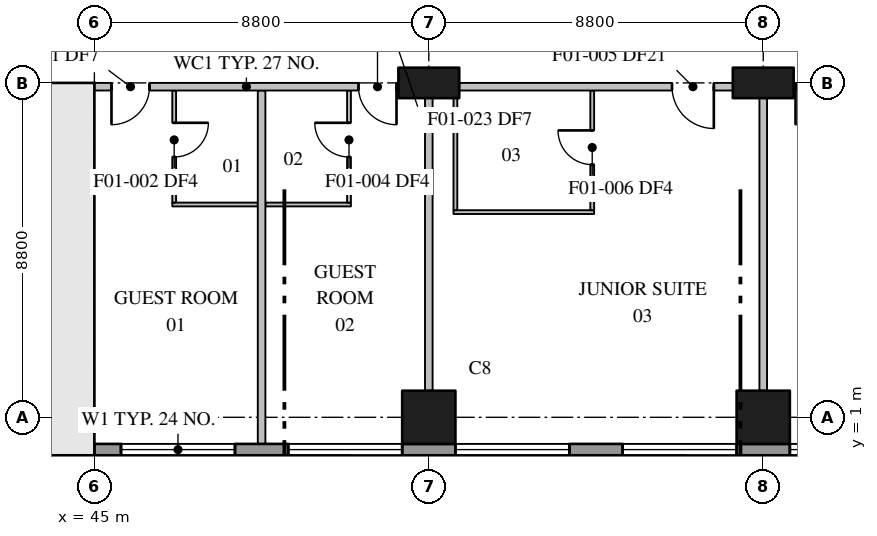
"""IFC4 building model, lengths in metres.
Left out: names, types, materials, properties, quantities, classifications, styles, units other than length and angle.
Written with IfcOpenShell. Run it as: python <this file> out.ifc"""

import sys

from ifc_helpers import new_model, si_unit, direction, frame, frame_2d, origin, origin_2d, place, context, subcontext, project, spatial, rectangle, extrude, element, fill, save


model = new_model("IFC4")
c1 = context("Model", 3, precision=1e-05, world=origin(), true_north=direction((0.0, 1.0)))
c2 = subcontext(c1, "Body", "Model", "MODEL_VIEW")
j1 = project(units=[si_unit("LENGTHUNIT", "METRE"), si_unit("PLANEANGLEUNIT", "RADIAN")], contexts=[c1])
p1 = place(None, origin())
s1 = spatial("IfcSite", under=j1, at=p1, CompositionType="ELEMENT")
p2 = place(p1, origin())
s2 = spatial("IfcBuilding", under=s1, at=p2, CompositionType="ELEMENT")
p3 = place(p2, frame((0.0, 0.0, 34.0)))
s3 = spatial("IfcBuildingStorey", under=s2, at=p3, CompositionType="ELEMENT", Elevation=34.0)
p4 = place(p3, frame((53.8, 1.0, 0.0), z_axis=(0.0, 0.0, 1.0), x_axis=(1.0, 0.0, 0.0)))
e1 = element("IfcColumn", 1, at=p4, inside=s3, PredefinedType="COLUMN", context=c2, shape_type="SweptSolid", body=[
    extrude(rectangle(XDim=1.4, YDim=1.4, at=origin_2d()), origin(), (0.0, 0.0, 1.0), 3.7),
])
p5 = place(p3, frame((53.8, 9.8, 0.0), z_axis=(0.0, 0.0, 1.0), x_axis=(1.0, 0.0, 0.0)))
e2 = element("IfcColumn", 2, at=p5, inside=s3, PredefinedType="COLUMN", context=c2, shape_type="SweptSolid", body=[
    extrude(rectangle(XDim=1.6, YDim=0.8, at=origin_2d()), origin(), (0.0, 0.0, 1.0), 3.7),
])
p6 = place(p3, frame((62.6, 1.0, 0.0), z_axis=(0.0, 0.0, 1.0), x_axis=(1.0, 0.0, 0.0)))
e3 = element("IfcColumn", 3, at=p6, inside=s3, PredefinedType="COLUMN", context=c2, shape_type="SweptSolid", body=[
    extrude(rectangle(XDim=1.4, YDim=1.4, at=origin_2d()), origin(), (0.0, 0.0, 1.0), 3.7),
])
p7 = place(p3, frame((62.6, 9.8, 0.0), z_axis=(0.0, 0.0, 1.0), x_axis=(1.0, 0.0, 0.0)))
e4 = element("IfcColumn", 4, at=p7, inside=s3, PredefinedType="COLUMN", context=c2, shape_type="SweptSolid", body=[
    extrude(rectangle(XDim=1.6, YDim=0.8, at=origin_2d()), origin(), (0.0, 0.0, 1.0), 3.7),
])
p8 = place(p3, frame((9.8, 0.7, 0.0), z_axis=(0.0, 0.0, 1.0), x_axis=(1.0, 0.0, 0.0)))
e5 = element("IfcWall", 5, at=p8, inside=s3, PredefinedType="SHEAR", context=c2, shape_type="SweptSolid", body=[
    extrude(rectangle(XDim=35.2, YDim=1.0, at=frame_2d((17.6, 0.0))), origin(), (0.0, 0.0, 1.0), 3.7),
])
p9 = place(p3, frame((44.3, 1.2, 0.0), z_axis=(0.0, 0.0, 1.0), x_axis=(0.0, 1.0, 0.0)))
e6 = element("IfcWall", 6, at=p9, inside=s3, PredefinedType="SHEAR", context=c2, shape_type="SweptSolid", body=[
    extrude(rectangle(XDim=8.6, YDim=1.0, at=frame_2d((4.3, 0.0))), origin(), (0.0, 0.0, 1.0), 3.7),
])
p10 = place(p3, frame((40.7, 9.6, 0.0), z_axis=(0.0, 0.0, 1.0), x_axis=(1.0, 0.0, 0.0)))
e7 = element("IfcWall", 7, at=p10, inside=s3, PredefinedType="SHEAR", context=c2, shape_type="SweptSolid", body=[
    extrude(rectangle(XDim=4.3, YDim=0.4, at=frame_2d((2.15, 0.0))), origin(), (0.0, 0.0, 1.0), 3.7),
])
p11 = place(p10, frame((1.05, 0.0, 0.0)))
e8 = element("IfcOpeningElement", 8, at=p11, cuts=e7, PredefinedType="OPENING", context=c2, shape_type="SweptSolid", body=[
    extrude(rectangle(XDim=1.2, YDim=2.1, at=frame_2d((0.6, 1.05))), frame((0.0, 0.21, 0.0), z_axis=(0.0, -1.0, 0.0), x_axis=(1.0, 0.0, 0.0)), (0.0, 0.0, 1.0), 0.42),
])
p12 = place(p3, frame((45.0, 0.15, 0.0), z_axis=(0.0, 0.0, 1.0), x_axis=(1.0, 0.0, 0.0)))
e9 = element("IfcWall", 9, at=p12, inside=s3, PredefinedType="STANDARD", context=c2, shape_type="SweptSolid", body=[
    extrude(rectangle(XDim=34.0, YDim=0.3, at=frame_2d((17.0, 0.0))), origin(), (0.0, 0.0, 1.0), 3.4),
])
p13 = place(p12, frame((0.7, 0.0, 0.75)))
e10 = element("IfcOpeningElement", 10, at=p13, cuts=e9, PredefinedType="OPENING", context=c2, shape_type="SweptSolid", body=[
    extrude(rectangle(XDim=3.0, YDim=2.3, at=frame_2d((1.5, 1.15))), frame((0.0, 0.16, 0.0), z_axis=(0.0, -1.0, 0.0), x_axis=(1.0, 0.0, 0.0)), (0.0, 0.0, 1.0), 0.32),
])
p14 = place(p12, frame((5.1, 0.0, 0.75)))
e11 = element("IfcOpeningElement", 11, at=p14, cuts=e9, PredefinedType="OPENING", context=c2, shape_type="SweptSolid", body=[
    extrude(rectangle(XDim=3.0, YDim=2.3, at=frame_2d((1.5, 1.15))), frame((0.0, 0.16, 0.0), z_axis=(0.0, -1.0, 0.0), x_axis=(1.0, 0.0, 0.0)), (0.0, 0.0, 1.0), 0.32),
])
p15 = place(p12, frame((9.5, 0.0, 0.75)))
e12 = element("IfcOpeningElement", 12, at=p15, cuts=e9, PredefinedType="OPENING", context=c2, shape_type="SweptSolid", body=[
    extrude(rectangle(XDim=3.0, YDim=2.3, at=frame_2d((1.5, 1.15))), frame((0.0, 0.16, 0.0), z_axis=(0.0, -1.0, 0.0), x_axis=(1.0, 0.0, 0.0)), (0.0, 0.0, 1.0), 0.32),
])
p16 = place(p12, frame((13.9, 0.0, 0.75)))
e13 = element("IfcOpeningElement", 13, at=p16, cuts=e9, PredefinedType="OPENING", context=c2, shape_type="SweptSolid", body=[
    extrude(rectangle(XDim=3.0, YDim=2.3, at=frame_2d((1.5, 1.15))), frame((0.0, 0.16, 0.0), z_axis=(0.0, -1.0, 0.0), x_axis=(1.0, 0.0, 0.0)), (0.0, 0.0, 1.0), 0.32),
])
p17 = place(p12, frame((18.3, 0.0, 0.75)))
e14 = element("IfcOpeningElement", 14, at=p17, cuts=e9, PredefinedType="OPENING", context=c2, shape_type="SweptSolid", body=[
    extrude(rectangle(XDim=3.0, YDim=2.3, at=frame_2d((1.5, 1.15))), frame((0.0, 0.16, 0.0), z_axis=(0.0, -1.0, 0.0), x_axis=(1.0, 0.0, 0.0)), (0.0, 0.0, 1.0), 0.32),
])
p18 = place(p12, frame((22.7, 0.0, 0.75)))
e15 = element("IfcOpeningElement", 15, at=p18, cuts=e9, PredefinedType="OPENING", context=c2, shape_type="SweptSolid", body=[
    extrude(rectangle(XDim=3.0, YDim=2.3, at=frame_2d((1.5, 1.15))), frame((0.0, 0.16, 0.0), z_axis=(0.0, -1.0, 0.0), x_axis=(1.0, 0.0, 0.0)), (0.0, 0.0, 1.0), 0.32),
])
p19 = place(p12, frame((27.1, 0.0, 0.75)))
e16 = element("IfcOpeningElement", 16, at=p19, cuts=e9, PredefinedType="OPENING", context=c2, shape_type="SweptSolid", body=[
    extrude(rectangle(XDim=3.0, YDim=2.3, at=frame_2d((1.5, 1.15))), frame((0.0, 0.16, 0.0), z_axis=(0.0, -1.0, 0.0), x_axis=(1.0, 0.0, 0.0)), (0.0, 0.0, 1.0), 0.32),
])
p20 = place(p3, frame((53.0, 9.7, 0.0), z_axis=(0.0, 0.0, 1.0), x_axis=(-1.0, 0.0, 0.0)))
e17 = element("IfcWall", 17, at=p20, inside=s3, PredefinedType="PARTITIONING", context=c2, shape_type="SweptSolid", body=[
    extrude(rectangle(XDim=8.0, YDim=0.2, at=frame_2d((4.0, 0.0))), origin(), (0.0, 0.0, 1.0), 3.4),
])
p21 = place(p20, frame((6.55, 0.0, 0.0)))
e18 = element("IfcOpeningElement", 18, at=p21, cuts=e17, PredefinedType="OPENING", context=c2, shape_type="SweptSolid", body=[
    extrude(rectangle(XDim=1.0, YDim=2.1, at=frame_2d((0.5, 1.05))), frame((0.0, 0.11, 0.0), z_axis=(0.0, -1.0, 0.0), x_axis=(1.0, 0.0, 0.0)), (0.0, 0.0, 1.0), 0.22),
])
p22 = place(p20, frame((0.05, 0.0, 0.0)))
e19 = element("IfcOpeningElement", 19, at=p22, cuts=e17, PredefinedType="OPENING", context=c2, shape_type="SweptSolid", body=[
    extrude(rectangle(XDim=1.0, YDim=2.1, at=frame_2d((0.5, 1.05))), frame((0.0, 0.11, 0.0), z_axis=(0.0, -1.0, 0.0), x_axis=(1.0, 0.0, 0.0)), (0.0, 0.0, 1.0), 0.22),
])
p23 = place(p3, frame((61.8, 9.7, 0.0), z_axis=(0.0, 0.0, 1.0), x_axis=(-1.0, 0.0, 0.0)))
e20 = element("IfcWall", 20, at=p23, inside=s3, PredefinedType="PARTITIONING", context=c2, shape_type="SweptSolid", body=[
    extrude(rectangle(XDim=7.2, YDim=0.2, at=frame_2d((3.6, 0.0))), origin(), (0.0, 0.0, 1.0), 3.4),
])
p24 = place(p23, frame((0.5, 0.0, 0.0)))
e21 = element("IfcOpeningElement", 21, at=p24, cuts=e20, PredefinedType="OPENING", context=c2, shape_type="SweptSolid", body=[
    extrude(rectangle(XDim=1.1, YDim=2.1, at=frame_2d((0.55, 1.05))), frame((0.0, 0.11, 0.0), z_axis=(0.0, -1.0, 0.0), x_axis=(1.0, 0.0, 0.0)), (0.0, 0.0, 1.0), 0.22),
])
p25 = place(p3, frame((70.6, 9.7, 0.0), z_axis=(0.0, 0.0, 1.0), x_axis=(-1.0, 0.0, 0.0)))
e22 = element("IfcWall", 22, at=p25, inside=s3, PredefinedType="PARTITIONING", context=c2, shape_type="SweptSolid", body=[
    extrude(rectangle(XDim=7.2, YDim=0.2, at=frame_2d((3.6, 0.0))), origin(), (0.0, 0.0, 1.0), 3.4),
])
p26 = place(p25, frame((6.15, 0.0, 0.0)))
e23 = element("IfcOpeningElement", 23, at=p26, cuts=e22, PredefinedType="OPENING", context=c2, shape_type="SweptSolid", body=[
    extrude(rectangle(XDim=1.0, YDim=2.1, at=frame_2d((0.5, 1.05))), frame((0.0, 0.11, 0.0), z_axis=(0.0, -1.0, 0.0), x_axis=(1.0, 0.0, 0.0)), (0.0, 0.0, 1.0), 0.22),
])
p27 = place(p25, frame((0.05, 0.0, 0.0)))
e24 = element("IfcOpeningElement", 24, at=p27, cuts=e22, PredefinedType="OPENING", context=c2, shape_type="SweptSolid", body=[
    extrude(rectangle(XDim=1.0, YDim=2.1, at=frame_2d((0.5, 1.05))), frame((0.0, 0.11, 0.0), z_axis=(0.0, -1.0, 0.0), x_axis=(1.0, 0.0, 0.0)), (0.0, 0.0, 1.0), 0.22),
])
p28 = place(p3, frame((49.4, 0.31, 0.0), z_axis=(0.0, 0.0, 1.0), x_axis=(0.0, 1.0, 0.0)))
e25 = element("IfcWall", 25, at=p28, inside=s3, PredefinedType="PARTITIONING", context=c2, shape_type="SweptSolid", body=[
    extrude(rectangle(XDim=9.29, YDim=0.2, at=frame_2d((4.645, 0.0))), origin(), (0.0, 0.0, 1.0), 3.4),
])
for number, where, z_axis, x_axis in (
    (26, (53.8, 1.7, 0.0), (0.0, 0.0, 1.0), (0.0, 1.0, 0.0)),
    (27, (62.6, 1.7, 0.0), (0.0, 0.0, 1.0), (0.0, 1.0, 0.0)),
):
    element("IfcWall", number, at=place(p3, frame(where, z_axis=z_axis, x_axis=x_axis)), inside=s3, PredefinedType="PARTITIONING", context=c2, shape_type="SweptSolid", body=[
        extrude(rectangle(XDim=7.7, YDim=0.2, at=frame_2d((3.85, 0.0))), origin(), (0.0, 0.0, 1.0), 3.4),
    ])
for number, where, z_axis, x_axis in (
    (28, (47.05, 6.6, 0.0), (0.0, 0.0, 1.0), (1.0, 0.0, 0.0)),
    (29, (49.5, 6.6, 0.0), (0.0, 0.0, 1.0), (1.0, 0.0, 0.0)),
):
    element("IfcWall", number, at=place(p3, frame(where, z_axis=z_axis, x_axis=x_axis)), inside=s3, PredefinedType="PARTITIONING", context=c2, shape_type="SweptSolid", body=[
        extrude(rectangle(XDim=2.25, YDim=0.1, at=frame_2d((1.125, 0.0))), origin(), (0.0, 0.0, 1.0), 3.4),
    ])
p29 = place(p3, frame((47.1, 9.6, 0.0), z_axis=(0.0, 0.0, 1.0), x_axis=(0.0, -1.0, 0.0)))
e30 = element("IfcWall", 30, at=p29, inside=s3, PredefinedType="PARTITIONING", context=c2, shape_type="SweptSolid", body=[
    extrude(rectangle(XDim=2.95, YDim=0.1, at=frame_2d((1.475, 0.0))), origin(), (0.0, 0.0, 1.0), 3.4),
])
p30 = place(p29, frame((0.85, 0.0, 0.0)))
e31 = element("IfcOpeningElement", 31, at=p30, cuts=e30, PredefinedType="OPENING", context=c2, shape_type="SweptSolid", body=[
    extrude(rectangle(XDim=0.9, YDim=2.1, at=frame_2d((0.45, 1.05))), frame((0.0, 0.06, 0.0), z_axis=(0.0, -1.0, 0.0), x_axis=(1.0, 0.0, 0.0)), (0.0, 0.0, 1.0), 0.12),
])
p31 = place(p3, frame((51.7, 6.65, 0.0), z_axis=(0.0, 0.0, 1.0), x_axis=(0.0, 1.0, 0.0)))
e32 = element("IfcWall", 32, at=p31, inside=s3, PredefinedType="PARTITIONING", context=c2, shape_type="SweptSolid", body=[
    extrude(rectangle(XDim=2.95, YDim=0.1, at=frame_2d((1.475, 0.0))), origin(), (0.0, 0.0, 1.0), 3.4),
])
p32 = place(p31, frame((1.2, 0.0, 0.0)))
e33 = element("IfcOpeningElement", 33, at=p32, cuts=e32, PredefinedType="OPENING", context=c2, shape_type="SweptSolid", body=[
    extrude(rectangle(XDim=0.9, YDim=2.1, at=frame_2d((0.45, 1.05))), frame((0.0, 0.06, 0.0), z_axis=(0.0, -1.0, 0.0), x_axis=(1.0, 0.0, 0.0)), (0.0, 0.0, 1.0), 0.12),
])
p33 = place(p3, frame((54.45, 6.4, 0.0), z_axis=(0.0, 0.0, 1.0), x_axis=(1.0, 0.0, 0.0)))
e34 = element("IfcWall", 34, at=p33, inside=s3, PredefinedType="PARTITIONING", context=c2, shape_type="SweptSolid", body=[
    extrude(rectangle(XDim=3.7, YDim=0.1, at=frame_2d((1.85, 0.0))), origin(), (0.0, 0.0, 1.0), 3.4),
])
p34 = place(p3, frame((54.5, 6.45, 0.0), z_axis=(0.0, 0.0, 1.0), x_axis=(0.0, 1.0, 0.0)))
e35 = element("IfcWall", 35, at=p34, inside=s3, PredefinedType="PARTITIONING", context=c2, shape_type="SweptSolid", body=[
    extrude(rectangle(XDim=2.95, YDim=0.1, at=frame_2d((1.475, 0.0))), origin(), (0.0, 0.0, 1.0), 3.4),
])
p35 = place(p3, frame((58.1, 6.45, 0.0), z_axis=(0.0, 0.0, 1.0), x_axis=(0.0, 1.0, 0.0)))
e36 = element("IfcWall", 36, at=p35, inside=s3, PredefinedType="PARTITIONING", context=c2, shape_type="SweptSolid", body=[
    extrude(rectangle(XDim=3.15, YDim=0.1, at=frame_2d((1.575, 0.0))), origin(), (0.0, 0.0, 1.0), 3.4),
])
p36 = place(p35, frame((1.2, 0.0, 0.0)))
e37 = element("IfcOpeningElement", 37, at=p36, cuts=e36, PredefinedType="OPENING", context=c2, shape_type="SweptSolid", body=[
    extrude(rectangle(XDim=0.9, YDim=2.1, at=frame_2d((0.45, 1.05))), frame((0.0, 0.06, 0.0), z_axis=(0.0, -1.0, 0.0), x_axis=(1.0, 0.0, 0.0)), (0.0, 0.0, 1.0), 0.12),
])
p37 = place(p13, origin())
e38 = element("IfcWindow", 38, at=p37, inside=s3, PartitioningType="SINGLE_PANEL", PredefinedType="WINDOW", context=c2, shape_type="SweptSolid", body=[
    extrude(rectangle(XDim=3.0, YDim=2.3, at=frame_2d((1.5, 1.15))), frame((0.0, 0.03, 0.0), z_axis=(0.0, -1.0, 0.0), x_axis=(1.0, 0.0, 0.0)), (0.0, 0.0, 1.0), 0.06),
])
fill(e10, e38)
p38 = place(p14, origin())
e39 = element("IfcWindow", 39, at=p38, inside=s3, PartitioningType="SINGLE_PANEL", PredefinedType="WINDOW", context=c2, shape_type="SweptSolid", body=[
    extrude(rectangle(XDim=3.0, YDim=2.3, at=frame_2d((1.5, 1.15))), frame((0.0, 0.03, 0.0), z_axis=(0.0, -1.0, 0.0), x_axis=(1.0, 0.0, 0.0)), (0.0, 0.0, 1.0), 0.06),
])
fill(e11, e39)
p39 = place(p15, origin())
e40 = element("IfcWindow", 40, at=p39, inside=s3, PartitioningType="SINGLE_PANEL", PredefinedType="WINDOW", context=c2, shape_type="SweptSolid", body=[
    extrude(rectangle(XDim=3.0, YDim=2.3, at=frame_2d((1.5, 1.15))), frame((0.0, 0.03, 0.0), z_axis=(0.0, -1.0, 0.0), x_axis=(1.0, 0.0, 0.0)), (0.0, 0.0, 1.0), 0.06),
])
fill(e12, e40)
p40 = place(p16, origin())
e41 = element("IfcWindow", 41, at=p40, inside=s3, PartitioningType="SINGLE_PANEL", PredefinedType="WINDOW", context=c2, shape_type="SweptSolid", body=[
    extrude(rectangle(XDim=3.0, YDim=2.3, at=frame_2d((1.5, 1.15))), frame((0.0, 0.03, 0.0), z_axis=(0.0, -1.0, 0.0), x_axis=(1.0, 0.0, 0.0)), (0.0, 0.0, 1.0), 0.06),
])
fill(e13, e41)
p41 = place(p17, origin())
e42 = element("IfcWindow", 42, at=p41, inside=s3, PartitioningType="SINGLE_PANEL", PredefinedType="WINDOW", context=c2, shape_type="SweptSolid", body=[
    extrude(rectangle(XDim=3.0, YDim=2.3, at=frame_2d((1.5, 1.15))), frame((0.0, 0.03, 0.0), z_axis=(0.0, -1.0, 0.0), x_axis=(1.0, 0.0, 0.0)), (0.0, 0.0, 1.0), 0.06),
])
fill(e14, e42)
p42 = place(p21, origin())
e43 = element("IfcDoor", 43, at=p42, inside=s3, OperationType="SINGLE_SWING_RIGHT", PredefinedType="DOOR", context=c2, shape_type="SweptSolid", body=[
    extrude(rectangle(XDim=1.0, YDim=2.1, at=frame_2d((0.5, 1.05))), frame((0.0, 0.025, 0.0), z_axis=(0.0, -1.0, 0.0), x_axis=(1.0, 0.0, 0.0)), (0.0, 0.0, 1.0), 0.05),
])
fill(e18, e43)
p43 = place(p30, origin())
e44 = element("IfcDoor", 44, at=p43, inside=s3, OperationType="SINGLE_SWING_LEFT", PredefinedType="DOOR", context=c2, shape_type="SweptSolid", body=[
    extrude(rectangle(XDim=0.9, YDim=2.1, at=frame_2d((0.45, 1.05))), frame((0.0, 0.025, 0.0), z_axis=(0.0, -1.0, 0.0), x_axis=(1.0, 0.0, 0.0)), (0.0, 0.0, 1.0), 0.05),
])
fill(e31, e44)
p44 = place(p22, origin())
e45 = element("IfcDoor", 45, at=p44, inside=s3, OperationType="SINGLE_SWING_LEFT", PredefinedType="DOOR", context=c2, shape_type="SweptSolid", body=[
    extrude(rectangle(XDim=1.0, YDim=2.1, at=frame_2d((0.5, 1.05))), frame((0.0, 0.025, 0.0), z_axis=(0.0, -1.0, 0.0), x_axis=(1.0, 0.0, 0.0)), (0.0, 0.0, 1.0), 0.05),
])
fill(e19, e45)
p45 = place(p32, origin())
e46 = element("IfcDoor", 46, at=p45, inside=s3, OperationType="SINGLE_SWING_RIGHT", PredefinedType="DOOR", context=c2, shape_type="SweptSolid", body=[
    extrude(rectangle(XDim=0.9, YDim=2.1, at=frame_2d((0.45, 1.05))), frame((0.0, 0.025, 0.0), z_axis=(0.0, -1.0, 0.0), x_axis=(1.0, 0.0, 0.0)), (0.0, 0.0, 1.0), 0.05),
])
fill(e33, e46)
p46 = place(p24, origin())
e47 = element("IfcDoor", 47, at=p46, inside=s3, OperationType="SINGLE_SWING_LEFT", PredefinedType="DOOR", context=c2, shape_type="SweptSolid", body=[
    extrude(rectangle(XDim=1.1, YDim=2.1, at=frame_2d((0.55, 1.05))), frame((0.0, 0.025, 0.0), z_axis=(0.0, -1.0, 0.0), x_axis=(1.0, 0.0, 0.0)), (0.0, 0.0, 1.0), 0.05),
])
fill(e21, e47)
p47 = place(p36, origin())
e48 = element("IfcDoor", 48, at=p47, inside=s3, OperationType="SINGLE_SWING_RIGHT", PredefinedType="DOOR", context=c2, shape_type="SweptSolid", body=[
    extrude(rectangle(XDim=0.9, YDim=2.1, at=frame_2d((0.45, 1.05))), frame((0.0, 0.025, 0.0), z_axis=(0.0, -1.0, 0.0), x_axis=(1.0, 0.0, 0.0)), (0.0, 0.0, 1.0), 0.05),
])
fill(e37, e48)
p48 = place(p26, origin())
e49 = element("IfcDoor", 49, at=p48, inside=s3, OperationType="SINGLE_SWING_RIGHT", PredefinedType="DOOR", context=c2, shape_type="SweptSolid", body=[
    extrude(rectangle(XDim=1.0, YDim=2.1, at=frame_2d((0.5, 1.05))), frame((0.0, 0.025, 0.0), z_axis=(0.0, -1.0, 0.0), x_axis=(1.0, 0.0, 0.0)), (0.0, 0.0, 1.0), 0.05),
])
fill(e23, e49)
save(model, sys.argv[1])
